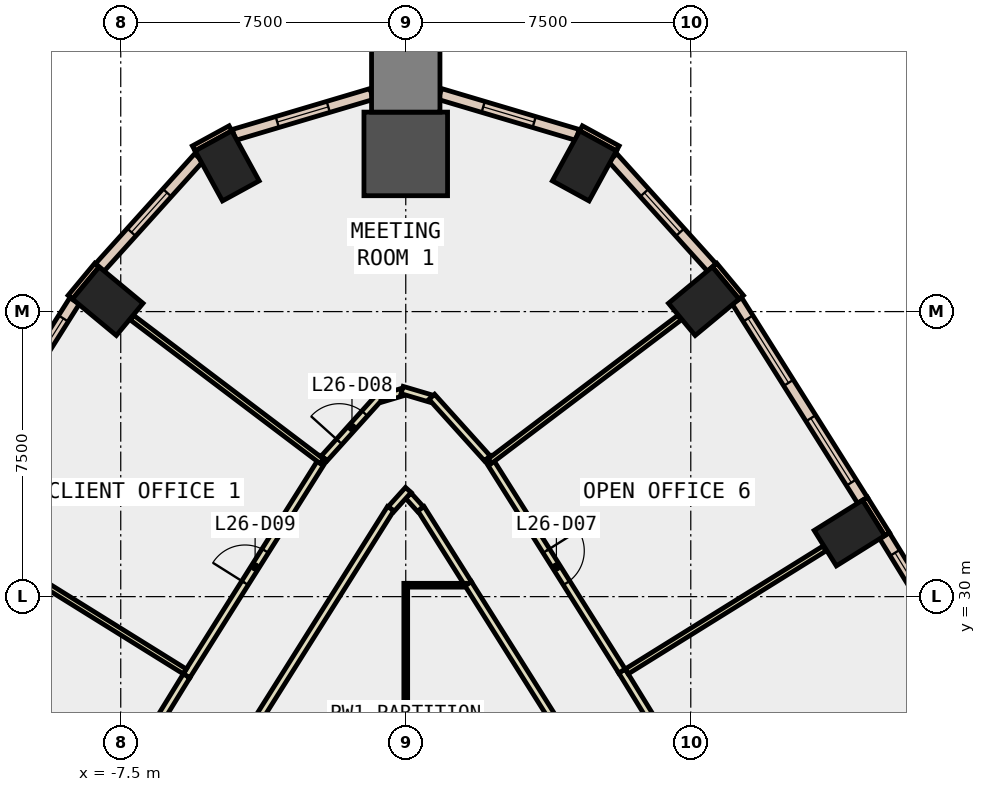
"""IFC4 building model, lengths in metres.
Left out: names, types, materials, properties, quantities, classifications, styles, units other than length and angle.
Written with IfcOpenShell. Run it as: python <this file> out.ifc"""

import sys

from ifc_helpers import new_model, si_unit, direction, frame, frame_2d, origin, origin_2d, place, context, subcontext, project, spatial, rectangle, extrude, element, fill, save


model = new_model("IFC4")
c1 = context("Model", 3, precision=1e-05, world=origin(), true_north=direction((0.0, 1.0)))
c2 = subcontext(c1, "Body", "Model", "MODEL_VIEW")
j1 = project(units=[si_unit("LENGTHUNIT", "METRE"), si_unit("PLANEANGLEUNIT", "RADIAN")], contexts=[c1])
p1 = place(None, origin())
s1 = spatial("IfcSite", under=j1, at=p1, CompositionType="ELEMENT")
p2 = place(p1, origin())
s2 = spatial("IfcBuilding", under=s1, at=p2, CompositionType="ELEMENT")
p3 = place(p2, frame((0.0, 0.0, 120.2)))
s3 = spatial("IfcBuildingStorey", under=s2, at=p3, CompositionType="ELEMENT", Elevation=120.2)
for number, where, z_axis, x_axis in (
    (1, (11.675, 31.673, -0.4), (0.0, 0.0, 1.0), (-0.53, 0.848, 0.0)),
    (2, (7.842, 37.774, -0.4), (0.0, 0.0, 1.0), (-0.638, 0.77, 0.0)),
    (3, (4.7, 41.334, -0.4), (0.0, 0.0, 1.0), (-0.877, 0.48, 0.0)),
):
    element("IfcColumn", number, at=place(p3, frame(where, z_axis=z_axis, x_axis=x_axis)), inside=s3, PredefinedType="COLUMN", context=c2, shape_type="SweptSolid", body=[
        extrude(rectangle(XDim=1.1, YDim=1.5, at=origin_2d()), origin(), (0.0, 0.0, 1.0), 4.2),
    ])
p4 = place(p3, frame((0.0, 41.649, -0.4), z_axis=(0.0, 0.0, 1.0), x_axis=(0.0, 1.0, 0.0)))
e4 = element("IfcColumn", 4, at=p4, inside=s3, PredefinedType="COLUMN", context=c2, shape_type="SweptSolid", body=[
    extrude(rectangle(XDim=2.2, YDim=2.2, at=origin_2d()), origin(), (0.0, 0.0, 1.0), 4.2),
])
for number, where, z_axis, x_axis in (
    (5, (-4.7, 41.334, -0.4), (0.0, 0.0, 1.0), (0.877, 0.48, 0.0)),
    (6, (-7.842, 37.774, -0.4), (0.0, 0.0, 1.0), (0.638, 0.77, 0.0)),
):
    element("IfcColumn", number, at=place(p3, frame(where, z_axis=z_axis, x_axis=x_axis)), inside=s3, PredefinedType="COLUMN", context=c2, shape_type="SweptSolid", body=[
        extrude(rectangle(XDim=1.1, YDim=1.5, at=origin_2d()), origin(), (0.0, 0.0, 1.0), 4.2),
    ])
p5 = place(p3, frame((0.0, 43.649, -0.4), z_axis=(0.0, 0.0, 1.0), x_axis=(0.0, 1.0, 0.0)))
e7 = element("IfcColumn", 7, at=p5, inside=s3, PredefinedType="COLUMN", context=c2, shape_type="SweptSolid", body=[
    extrude(rectangle(XDim=1.8, YDim=1.8, at=origin_2d()), origin(), (0.0, 0.0, 1.0), 4.2),
])
for number, where, z_axis, x_axis in (
    (8, (5.579, 41.794, 0.0), (0.0, 0.0, 1.0), (-0.877, 0.48, 0.0)),
    (9, (-4.613, 42.322, 0.0), (0.0, 0.0, 1.0), (-0.877, -0.48, 0.0)),
):
    element("IfcWall", number, at=place(p3, frame(where, z_axis=z_axis, x_axis=x_axis)), inside=s3, PredefinedType="STANDARD", context=c2, shape_type="SweptSolid", body=[
        extrude(rectangle(XDim=1.101, YDim=0.15, at=frame_2d((0.551, 0.0))), origin(), (0.0, 0.0, 1.0), 3.8),
    ])
p6 = place(p3, frame((12.666, 31.644, 0.0), z_axis=(0.0, 0.0, 1.0), x_axis=(-0.52997899071, 0.848010771987, 0.0)))
e10 = element("IfcWall", 10, at=p6, inside=s3, PredefinedType="STANDARD", context=c2, shape_type="SweptSolid", body=[
    extrude(rectangle(XDim=1.1, YDim=0.15, at=frame_2d((0.55, 0.0))), origin(), (0.0, 0.0, 1.0), 3.8),
])
for number, where, z_axis, x_axis in (
    (11, (8.828, 37.878, 0.0), (0.0, 0.0, 1.0), (-0.638, 0.77, 0.0)),
    (12, (-8.126, 38.724, 0.0), (0.0, 0.0, 1.0), (-0.638, -0.77, 0.0)),
):
    element("IfcWall", number, at=place(p3, frame(where, z_axis=z_axis, x_axis=x_axis)), inside=s3, PredefinedType="STANDARD", context=c2, shape_type="SweptSolid", body=[
        extrude(rectangle(XDim=1.099, YDim=0.15, at=frame_2d((0.55, 0.0))), origin(), (0.0, 0.0, 1.0), 3.8),
    ])
p7 = place(p3, frame((15.796, 26.397, 0.0), z_axis=(0.0, 0.0, 1.0), x_axis=(-0.523417276981, 0.852076495485, 0.0)))
e13 = element("IfcWall", 13, at=p7, inside=s3, PredefinedType="STANDARD", context=c2, shape_type="SweptSolid", body=[
    extrude(rectangle(XDim=6.11, YDim=0.3, at=frame_2d((3.055, 0.0))), origin(), (0.0, 0.0, 1.0), 3.8),
])
p8 = place(p7, frame((0.527, 0.0, 0.9)))
e14 = element("IfcOpeningElement", 14, at=p8, cuts=e13, PredefinedType="OPENING", context=c2, shape_type="SweptSolid", body=[
    extrude(rectangle(XDim=2.0, YDim=2.6, at=frame_2d((1.0, 1.3))), frame((0.0, 0.16, 0.0), z_axis=(0.0, -1.0, 0.0), x_axis=(1.0, 0.0, 0.0)), (0.0, 0.0, 1.0), 0.32),
])
p9 = place(p7, frame((3.582, 0.0, 0.9)))
e15 = element("IfcOpeningElement", 15, at=p9, cuts=e13, PredefinedType="OPENING", context=c2, shape_type="SweptSolid", body=[
    extrude(rectangle(XDim=2.0, YDim=2.6, at=frame_2d((1.0, 1.3))), frame((0.0, 0.16, 0.0), z_axis=(0.0, -1.0, 0.0), x_axis=(1.0, 0.0, 0.0)), (0.0, 0.0, 1.0), 0.32),
])
p10 = place(p3, frame((12.018, 32.535, 0.0), z_axis=(0.0, 0.0, 1.0), x_axis=(-0.532699467907, 0.846304482377, 0.0)))
e16 = element("IfcWall", 16, at=p10, inside=s3, PredefinedType="STANDARD", context=c2, shape_type="SweptSolid", body=[
    extrude(rectangle(XDim=6.202, YDim=0.3, at=frame_2d((3.101, 0.0))), origin(), (0.0, 0.0, 1.0), 3.8),
])
p11 = place(p10, frame((0.551, 0.0, 0.9)))
e17 = element("IfcOpeningElement", 17, at=p11, cuts=e16, PredefinedType="OPENING", context=c2, shape_type="SweptSolid", body=[
    extrude(rectangle(XDim=2.0, YDim=2.6, at=frame_2d((1.0, 1.3))), frame((0.0, 0.16, 0.0), z_axis=(0.0, -1.0, 0.0), x_axis=(1.0, 0.0, 0.0)), (0.0, 0.0, 1.0), 0.32),
])
p12 = place(p10, frame((3.652, 0.0, 0.9)))
e18 = element("IfcOpeningElement", 18, at=p12, cuts=e16, PredefinedType="OPENING", context=c2, shape_type="SweptSolid", body=[
    extrude(rectangle(XDim=2.0, YDim=2.6, at=frame_2d((1.0, 1.3))), frame((0.0, 0.16, 0.0), z_axis=(0.0, -1.0, 0.0), x_axis=(1.0, 0.0, 0.0)), (0.0, 0.0, 1.0), 0.32),
])
p13 = place(p3, frame((8.052, 38.661, 0.0), z_axis=(0.0, 0.0, 1.0), x_axis=(-0.66966434159, 0.742663900834, 0.0)))
e19 = element("IfcWall", 19, at=p13, inside=s3, PredefinedType="STANDARD", context=c2, shape_type="SweptSolid", body=[
    extrude(rectangle(XDim=3.893, YDim=0.3, at=frame_2d((1.946, 0.0))), origin(), (0.0, 0.0, 1.0), 3.8),
])
p14 = place(p13, frame((1.246, 0.0, 0.9)))
e20 = element("IfcOpeningElement", 20, at=p14, cuts=e19, PredefinedType="OPENING", context=c2, shape_type="SweptSolid", body=[
    extrude(rectangle(XDim=1.4, YDim=2.6, at=frame_2d((0.7, 1.3))), frame((0.0, 0.16, 0.0), z_axis=(0.0, -1.0, 0.0), x_axis=(1.0, 0.0, 0.0)), (0.0, 0.0, 1.0), 0.32),
])
p15 = place(p3, frame((4.52, 42.149, 0.0), z_axis=(0.0, 0.0, 1.0), x_axis=(-0.958563070772, 0.284880394819, 0.0)))
e21 = element("IfcWall", 21, at=p15, inside=s3, PredefinedType="STANDARD", context=c2, shape_type="SweptSolid", body=[
    extrude(rectangle(XDim=3.778, YDim=0.3, at=frame_2d((1.889, 0.0))), origin(), (0.0, 0.0, 1.0), 3.8),
])
p16 = place(p15, frame((1.189, 0.0, 0.9)))
e22 = element("IfcOpeningElement", 22, at=p16, cuts=e21, PredefinedType="OPENING", context=c2, shape_type="SweptSolid", body=[
    extrude(rectangle(XDim=1.4, YDim=2.6, at=frame_2d((0.7, 1.3))), frame((0.0, 0.16, 0.0), z_axis=(0.0, -1.0, 0.0), x_axis=(1.0, 0.0, 0.0)), (0.0, 0.0, 1.0), 0.32),
])
p17 = place(p3, frame((-0.899, 43.225, 0.0), z_axis=(0.0, 0.0, 1.0), x_axis=(-0.958563070772, -0.284880394819, 0.0)))
e23 = element("IfcWall", 23, at=p17, inside=s3, PredefinedType="STANDARD", context=c2, shape_type="SweptSolid", body=[
    extrude(rectangle(XDim=3.778, YDim=0.3, at=frame_2d((1.889, 0.0))), origin(), (0.0, 0.0, 1.0), 3.8),
])
p18 = place(p17, frame((1.189, 0.0, 0.9)))
e24 = element("IfcOpeningElement", 24, at=p18, cuts=e23, PredefinedType="OPENING", context=c2, shape_type="SweptSolid", body=[
    extrude(rectangle(XDim=1.4, YDim=2.6, at=frame_2d((0.7, 1.3))), frame((0.0, 0.16, 0.0), z_axis=(0.0, -1.0, 0.0), x_axis=(1.0, 0.0, 0.0)), (0.0, 0.0, 1.0), 0.32),
])
p19 = place(p3, frame((-5.445, 41.552, 0.0), z_axis=(0.0, 0.0, 1.0), x_axis=(-0.66966434159, -0.742663900834, 0.0)))
e25 = element("IfcWall", 25, at=p19, inside=s3, PredefinedType="STANDARD", context=c2, shape_type="SweptSolid", body=[
    extrude(rectangle(XDim=3.893, YDim=0.3, at=frame_2d((1.946, 0.0))), origin(), (0.0, 0.0, 1.0), 3.8),
])
p20 = place(p19, frame((1.246, 0.0, 0.9)))
e26 = element("IfcOpeningElement", 26, at=p20, cuts=e25, PredefinedType="OPENING", context=c2, shape_type="SweptSolid", body=[
    extrude(rectangle(XDim=1.4, YDim=2.6, at=frame_2d((0.7, 1.3))), frame((0.0, 0.16, 0.0), z_axis=(0.0, -1.0, 0.0), x_axis=(1.0, 0.0, 0.0)), (0.0, 0.0, 1.0), 0.32),
])
p21 = place(p3, frame((-8.714, 37.784, 0.0), z_axis=(0.0, 0.0, 1.0), x_axis=(-0.532699467907, -0.846304482377, 0.0)))
e27 = element("IfcWall", 27, at=p21, inside=s3, PredefinedType="STANDARD", context=c2, shape_type="SweptSolid", body=[
    extrude(rectangle(XDim=6.202, YDim=0.3, at=frame_2d((3.101, 0.0))), origin(), (0.0, 0.0, 1.0), 3.8),
])
p22 = place(p21, frame((0.551, 0.0, 0.9)))
e28 = element("IfcOpeningElement", 28, at=p22, cuts=e27, PredefinedType="OPENING", context=c2, shape_type="SweptSolid", body=[
    extrude(rectangle(XDim=2.0, YDim=2.6, at=frame_2d((1.0, 1.3))), frame((0.0, 0.16, 0.0), z_axis=(0.0, -1.0, 0.0), x_axis=(1.0, 0.0, 0.0)), (0.0, 0.0, 1.0), 0.32),
])
p23 = place(p21, frame((3.652, 0.0, 0.9)))
e29 = element("IfcOpeningElement", 29, at=p23, cuts=e27, PredefinedType="OPENING", context=c2, shape_type="SweptSolid", body=[
    extrude(rectangle(XDim=2.0, YDim=2.6, at=frame_2d((1.0, 1.3))), frame((0.0, 0.16, 0.0), z_axis=(0.0, -1.0, 0.0), x_axis=(1.0, 0.0, 0.0)), (0.0, 0.0, 1.0), 0.32),
])
p24 = place(p3, frame((3.861, 26.816, 0.0), z_axis=(0.0, 0.0, 1.0), x_axis=(-0.532782188792, 0.846252408745, 0.0)))
e30 = element("IfcWall", 30, at=p24, inside=s3, PredefinedType="PARTITIONING", context=c2, shape_type="SweptSolid", body=[
    extrude(rectangle(XDim=4.167, YDim=0.2, at=frame_2d((2.083, 0.0))), origin(), (0.0, 0.0, 1.0), 3.8),
])
p25 = place(p3, frame((1.641, 30.342, 0.0), z_axis=(0.0, 0.0, 1.0), x_axis=(-0.532732797088, 0.846283502679, 0.0)))
e31 = element("IfcWall", 31, at=p25, inside=s3, PredefinedType="PARTITIONING", context=c2, shape_type="SweptSolid", body=[
    extrude(rectangle(XDim=2.333, YDim=0.2, at=frame_2d((1.167, 0.0))), origin(), (0.0, 0.0, 1.0), 3.8),
])
p26 = place(p3, frame((0.384, 32.306, 0.0), z_axis=(0.0, 0.0, 1.0), x_axis=(-0.669306261406, 0.742986627365, 0.0)))
e32 = element("IfcWall", 32, at=p26, inside=s3, PredefinedType="PARTITIONING", context=c2, shape_type="SweptSolid", body=[
    extrude(rectangle(XDim=0.474, YDim=0.2, at=frame_2d((0.237, 0.0))), origin(), (0.0, 0.0, 1.0), 3.8),
])
p27 = place(p3, frame((0.067, 32.807, 0.0), z_axis=(0.0, 0.0, 1.0), x_axis=(-0.66900475403, -0.74325812413, 0.0)))
e33 = element("IfcWall", 33, at=p27, inside=s3, PredefinedType="PARTITIONING", context=c2, shape_type="SweptSolid", body=[
    extrude(rectangle(XDim=0.674, YDim=0.2, at=frame_2d((0.337, 0.0))), origin(), (0.0, 0.0, 1.0), 3.8),
])
p28 = place(p3, frame((-0.398, 32.317, 0.0), z_axis=(0.0, 0.0, 1.0), x_axis=(-0.53276445777, -0.846263571553, 0.0)))
e34 = element("IfcWall", 34, at=p28, inside=s3, PredefinedType="PARTITIONING", context=c2, shape_type="SweptSolid", body=[
    extrude(rectangle(XDim=6.5, YDim=0.2, at=frame_2d((3.25, 0.0))), origin(), (0.0, 0.0, 1.0), 3.8),
])
p29 = place(p3, frame((5.69, 28.042, 0.0), z_axis=(0.0, 0.0, 1.0), x_axis=(0.523381868706, -0.852098245222, 0.0)))
e35 = element("IfcWall", 35, at=p29, inside=s3, PredefinedType="PARTITIONING", context=c2, shape_type="SweptSolid", body=[
    extrude(rectangle(XDim=7.198, YDim=0.2, at=frame_2d((3.599, 0.0))), origin(), (0.0, 0.0, 1.0), 3.8),
])
p30 = place(p29, frame((3.099, 0.0, 0.0)))
e36 = element("IfcOpeningElement", 36, at=p30, cuts=e35, PredefinedType="OPENING", context=c2, shape_type="SweptSolid", body=[
    extrude(rectangle(XDim=1.0, YDim=2.1, at=frame_2d((0.5, 1.05))), frame((0.0, 0.11, 0.0), z_axis=(0.0, -1.0, 0.0), x_axis=(1.0, 0.0, 0.0)), (0.0, 0.0, 1.0), 0.22),
])
p31 = place(p3, frame((2.159, 33.649, 0.0), z_axis=(0.0, 0.0, 1.0), x_axis=(0.532784927572, -0.846250684462, 0.0)))
e37 = element("IfcWall", 37, at=p31, inside=s3, PredefinedType="PARTITIONING", context=c2, shape_type="SweptSolid", body=[
    extrude(rectangle(XDim=6.626, YDim=0.2, at=frame_2d((3.313, 0.0))), origin(), (0.0, 0.0, 1.0), 3.8),
])
p32 = place(p31, frame((2.888, 0.0, 0.0)))
e38 = element("IfcOpeningElement", 38, at=p32, cuts=e37, PredefinedType="OPENING", context=c2, shape_type="SweptSolid", body=[
    extrude(rectangle(XDim=1.0, YDim=2.1, at=frame_2d((0.5, 1.05))), frame((0.0, 0.11, 0.0), z_axis=(0.0, -1.0, 0.0), x_axis=(1.0, 0.0, 0.0)), (0.0, 0.0, 1.0), 0.22),
])
p33 = place(p3, frame((-2.145, 33.639, 0.0), z_axis=(0.0, 0.0, 1.0), x_axis=(0.66965737341, 0.742670184023, 0.0)))
e39 = element("IfcWall", 39, at=p33, inside=s3, PredefinedType="PARTITIONING", context=c2, shape_type="SweptSolid", body=[
    extrude(rectangle(XDim=2.18, YDim=0.2, at=frame_2d((1.09, 0.0))), origin(), (0.0, 0.0, 1.0), 3.8),
])
p34 = place(p33, frame((0.59, 0.0, 0.0)))
e40 = element("IfcOpeningElement", 40, at=p34, cuts=e39, PredefinedType="OPENING", context=c2, shape_type="SweptSolid", body=[
    extrude(rectangle(XDim=1.0, YDim=2.1, at=frame_2d((0.5, 1.05))), frame((0.0, 0.11, 0.0), z_axis=(0.0, -1.0, 0.0), x_axis=(1.0, 0.0, 0.0)), (0.0, 0.0, 1.0), 0.22),
])
p35 = place(p3, frame((-0.656, 35.213, 0.0), z_axis=(0.0, 0.0, 1.0), x_axis=(0.958764375257, 0.284202168777, 0.0)))
e41 = element("IfcWall", 41, at=p35, inside=s3, PredefinedType="PARTITIONING", context=c2, shape_type="SweptSolid", body=[
    extrude(rectangle(XDim=0.584, YDim=0.2, at=frame_2d((0.292, 0.0))), origin(), (0.0, 0.0, 1.0), 3.8),
])
p36 = place(p3, frame((-0.096, 35.436, 0.0), z_axis=(0.0, 0.0, 1.0), x_axis=(0.95867870552, -0.284491018456, 0.0)))
e42 = element("IfcWall", 42, at=p36, inside=s3, PredefinedType="PARTITIONING", context=c2, shape_type="SweptSolid", body=[
    extrude(rectangle(XDim=0.784, YDim=0.2, at=frame_2d((0.392, 0.0))), origin(), (0.0, 0.0, 1.0), 3.8),
])
p37 = place(p3, frame((0.685, 35.258, 0.0), z_axis=(0.0, 0.0, 1.0), x_axis=(0.66965737341, -0.742670184023, 0.0)))
e43 = element("IfcWall", 43, at=p37, inside=s3, PredefinedType="PARTITIONING", context=c2, shape_type="SweptSolid", body=[
    extrude(rectangle(XDim=2.18, YDim=0.2, at=frame_2d((1.09, 0.0))), origin(), (0.0, 0.0, 1.0), 3.8),
])
p38 = place(p3, frame((-5.769, 27.915, 0.0), z_axis=(0.0, 0.0, 1.0), x_axis=(0.532800846123, 0.846240662206, 0.0)))
e44 = element("IfcWall", 44, at=p38, inside=s3, PredefinedType="PARTITIONING", context=c2, shape_type="SweptSolid", body=[
    extrude(rectangle(XDim=6.776, YDim=0.2, at=frame_2d((3.388, 0.0))), origin(), (0.0, 0.0, 1.0), 3.8),
])
p39 = place(p38, frame((2.888, 0.0, 0.0)))
e45 = element("IfcOpeningElement", 45, at=p39, cuts=e44, PredefinedType="OPENING", context=c2, shape_type="SweptSolid", body=[
    extrude(rectangle(XDim=1.0, YDim=2.1, at=frame_2d((0.5, 1.05))), frame((0.0, 0.11, 0.0), z_axis=(0.0, -1.0, 0.0), x_axis=(1.0, 0.0, 0.0)), (0.0, 0.0, 1.0), 0.22),
])
p40 = place(p3, frame((-9.457, 21.909, 0.0), z_axis=(0.0, 0.0, 1.0), x_axis=(0.523366731761, 0.852107542559, 0.0)))
e46 = element("IfcWall", 46, at=p40, inside=s3, PredefinedType="PARTITIONING", context=c2, shape_type="SweptSolid", body=[
    extrude(rectangle(XDim=7.049, YDim=0.2, at=frame_2d((3.524, 0.0))), origin(), (0.0, 0.0, 1.0), 3.8),
])
p41 = place(p40, frame((3.099, 0.0, 0.0)))
e47 = element("IfcOpeningElement", 47, at=p41, cuts=e46, PredefinedType="OPENING", context=c2, shape_type="SweptSolid", body=[
    extrude(rectangle(XDim=1.0, YDim=2.1, at=frame_2d((0.5, 1.05))), frame((0.0, 0.11, 0.0), z_axis=(0.0, -1.0, 0.0), x_axis=(1.0, 0.0, 0.0)), (0.0, 0.0, 1.0), 0.22),
])
p42 = place(p3, frame((0.0, 23.5, 0.0), z_axis=(0.0, 0.0, 1.0), x_axis=(0.0, 1.0, 0.0)))
e48 = element("IfcWall", 48, at=p42, inside=s3, PredefinedType="PARTITIONING", context=c2, shape_type="SweptSolid", body=[
    extrude(rectangle(XDim=6.85, YDim=0.1, at=frame_2d((3.425, 0.0))), origin(), (0.0, 0.0, 1.0), 3.8),
])
p43 = place(p3, frame((0.05, 30.3, 0.0), z_axis=(0.0, 0.0, 1.0), x_axis=(1.0, 0.0, 0.0)))
e49 = element("IfcWall", 49, at=p43, inside=s3, PredefinedType="PARTITIONING", context=c2, shape_type="SweptSolid", body=[
    extrude(rectangle(XDim=1.518, YDim=0.1, at=frame_2d((0.759, 0.0))), origin(), (0.0, 0.0, 1.0), 3.8),
])
p44 = place(p3, frame((5.814, 28.031, 0.0), z_axis=(0.0, 0.0, 1.0), x_axis=(0.849222099047, 0.528035819324, 0.0)))
e50 = element("IfcWall", 50, at=p44, inside=s3, PredefinedType="PARTITIONING", context=c2, shape_type="SweptSolid", body=[
    extrude(rectangle(XDim=6.13, YDim=0.15, at=frame_2d((3.065, 0.0))), origin(), (0.0, 0.0, 1.0), 3.8),
])
for number, where, z_axis, x_axis in (
    (51, (2.212, 33.565, 0.0), (0.0, 0.0, 1.0), (0.797, 0.603, 0.0)),
    (52, (-2.212, 33.565, 0.0), (0.0, 0.0, 1.0), (-0.797, 0.603, 0.0)),
):
    element("IfcWall", number, at=place(p3, frame(where, z_axis=z_axis, x_axis=x_axis)), inside=s3, PredefinedType="PARTITIONING", context=c2, shape_type="SweptSolid", body=[
        extrude(rectangle(XDim=6.257, YDim=0.15, at=frame_2d((3.128, 0.0))), origin(), (0.0, 0.0, 1.0), 3.8),
    ])
p45 = place(p3, frame((-5.814, 28.031, 0.0), z_axis=(0.0, 0.0, 1.0), x_axis=(-0.849222099047, 0.528035819324, 0.0)))
e53 = element("IfcWall", 53, at=p45, inside=s3, PredefinedType="PARTITIONING", context=c2, shape_type="SweptSolid", body=[
    extrude(rectangle(XDim=6.13, YDim=0.15, at=frame_2d((3.065, 0.0))), origin(), (0.0, 0.0, 1.0), 3.8),
])
p46 = place(p9, origin())
e54 = element("IfcWindow", 54, at=p46, inside=s3, PartitioningType="SINGLE_PANEL", PredefinedType="WINDOW", context=c2, shape_type="SweptSolid", body=[
    extrude(rectangle(XDim=2.0, YDim=2.6, at=frame_2d((1.0, 1.3))), frame((0.0, 0.03, 0.0), z_axis=(0.0, -1.0, 0.0), x_axis=(1.0, 0.0, 0.0)), (0.0, 0.0, 1.0), 0.06),
])
fill(e15, e54)
p47 = place(p11, origin())
e55 = element("IfcWindow", 55, at=p47, inside=s3, PartitioningType="SINGLE_PANEL", PredefinedType="WINDOW", context=c2, shape_type="SweptSolid", body=[
    extrude(rectangle(XDim=2.0, YDim=2.6, at=frame_2d((1.0, 1.3))), frame((0.0, 0.03, 0.0), z_axis=(0.0, -1.0, 0.0), x_axis=(1.0, 0.0, 0.0)), (0.0, 0.0, 1.0), 0.06),
])
fill(e17, e55)
p48 = place(p12, origin())
e56 = element("IfcWindow", 56, at=p48, inside=s3, PartitioningType="SINGLE_PANEL", PredefinedType="WINDOW", context=c2, shape_type="SweptSolid", body=[
    extrude(rectangle(XDim=2.0, YDim=2.6, at=frame_2d((1.0, 1.3))), frame((0.0, 0.03, 0.0), z_axis=(0.0, -1.0, 0.0), x_axis=(1.0, 0.0, 0.0)), (0.0, 0.0, 1.0), 0.06),
])
fill(e18, e56)
p49 = place(p14, origin())
e57 = element("IfcWindow", 57, at=p49, inside=s3, PartitioningType="SINGLE_PANEL", PredefinedType="WINDOW", context=c2, shape_type="SweptSolid", body=[
    extrude(rectangle(XDim=1.4, YDim=2.6, at=frame_2d((0.7, 1.3))), frame((0.0, 0.03, 0.0), z_axis=(0.0, -1.0, 0.0), x_axis=(1.0, 0.0, 0.0)), (0.0, 0.0, 1.0), 0.06),
])
fill(e20, e57)
p50 = place(p16, origin())
e58 = element("IfcWindow", 58, at=p50, inside=s3, PartitioningType="SINGLE_PANEL", PredefinedType="WINDOW", context=c2, shape_type="SweptSolid", body=[
    extrude(rectangle(XDim=1.4, YDim=2.6, at=frame_2d((0.7, 1.3))), frame((0.0, 0.03, 0.0), z_axis=(0.0, -1.0, 0.0), x_axis=(1.0, 0.0, 0.0)), (0.0, 0.0, 1.0), 0.06),
])
fill(e22, e58)
p51 = place(p18, origin())
e59 = element("IfcWindow", 59, at=p51, inside=s3, PartitioningType="SINGLE_PANEL", PredefinedType="WINDOW", context=c2, shape_type="SweptSolid", body=[
    extrude(rectangle(XDim=1.4, YDim=2.6, at=frame_2d((0.7, 1.3))), frame((0.0, 0.03, 0.0), z_axis=(0.0, -1.0, 0.0), x_axis=(1.0, 0.0, 0.0)), (0.0, 0.0, 1.0), 0.06),
])
fill(e24, e59)
p52 = place(p20, origin())
e60 = element("IfcWindow", 60, at=p52, inside=s3, PartitioningType="SINGLE_PANEL", PredefinedType="WINDOW", context=c2, shape_type="SweptSolid", body=[
    extrude(rectangle(XDim=1.4, YDim=2.6, at=frame_2d((0.7, 1.3))), frame((0.0, 0.03, 0.0), z_axis=(0.0, -1.0, 0.0), x_axis=(1.0, 0.0, 0.0)), (0.0, 0.0, 1.0), 0.06),
])
fill(e26, e60)
p53 = place(p22, origin())
e61 = element("IfcWindow", 61, at=p53, inside=s3, PartitioningType="SINGLE_PANEL", PredefinedType="WINDOW", context=c2, shape_type="SweptSolid", body=[
    extrude(rectangle(XDim=2.0, YDim=2.6, at=frame_2d((1.0, 1.3))), frame((0.0, 0.03, 0.0), z_axis=(0.0, -1.0, 0.0), x_axis=(1.0, 0.0, 0.0)), (0.0, 0.0, 1.0), 0.06),
])
fill(e28, e61)
p54 = place(p32, origin())
e62 = element("IfcDoor", 62, at=p54, inside=s3, OperationType="SINGLE_SWING_LEFT", PredefinedType="DOOR", context=c2, shape_type="SweptSolid", body=[
    extrude(rectangle(XDim=1.0, YDim=2.1, at=frame_2d((0.5, 1.05))), frame((0.0, 0.025, 0.0), z_axis=(0.0, -1.0, 0.0), x_axis=(1.0, 0.0, 0.0)), (0.0, 0.0, 1.0), 0.05),
])
fill(e38, e62)
p55 = place(p34, origin())
e63 = element("IfcDoor", 63, at=p55, inside=s3, OperationType="SINGLE_SWING_LEFT", PredefinedType="DOOR", context=c2, shape_type="SweptSolid", body=[
    extrude(rectangle(XDim=1.0, YDim=2.1, at=frame_2d((0.5, 1.05))), frame((0.0, 0.025, 0.0), z_axis=(0.0, -1.0, 0.0), x_axis=(1.0, 0.0, 0.0)), (0.0, 0.0, 1.0), 0.05),
])
fill(e40, e63)
p56 = place(p39, origin())
e64 = element("IfcDoor", 64, at=p56, inside=s3, OperationType="SINGLE_SWING_LEFT", PredefinedType="DOOR", context=c2, shape_type="SweptSolid", body=[
    extrude(rectangle(XDim=1.0, YDim=2.1, at=frame_2d((0.5, 1.05))), frame((0.0, 0.025, 0.0), z_axis=(0.0, -1.0, 0.0), x_axis=(1.0, 0.0, 0.0)), (0.0, 0.0, 1.0), 0.05),
])
fill(e45, e64)
save(model, sys.argv[1])
